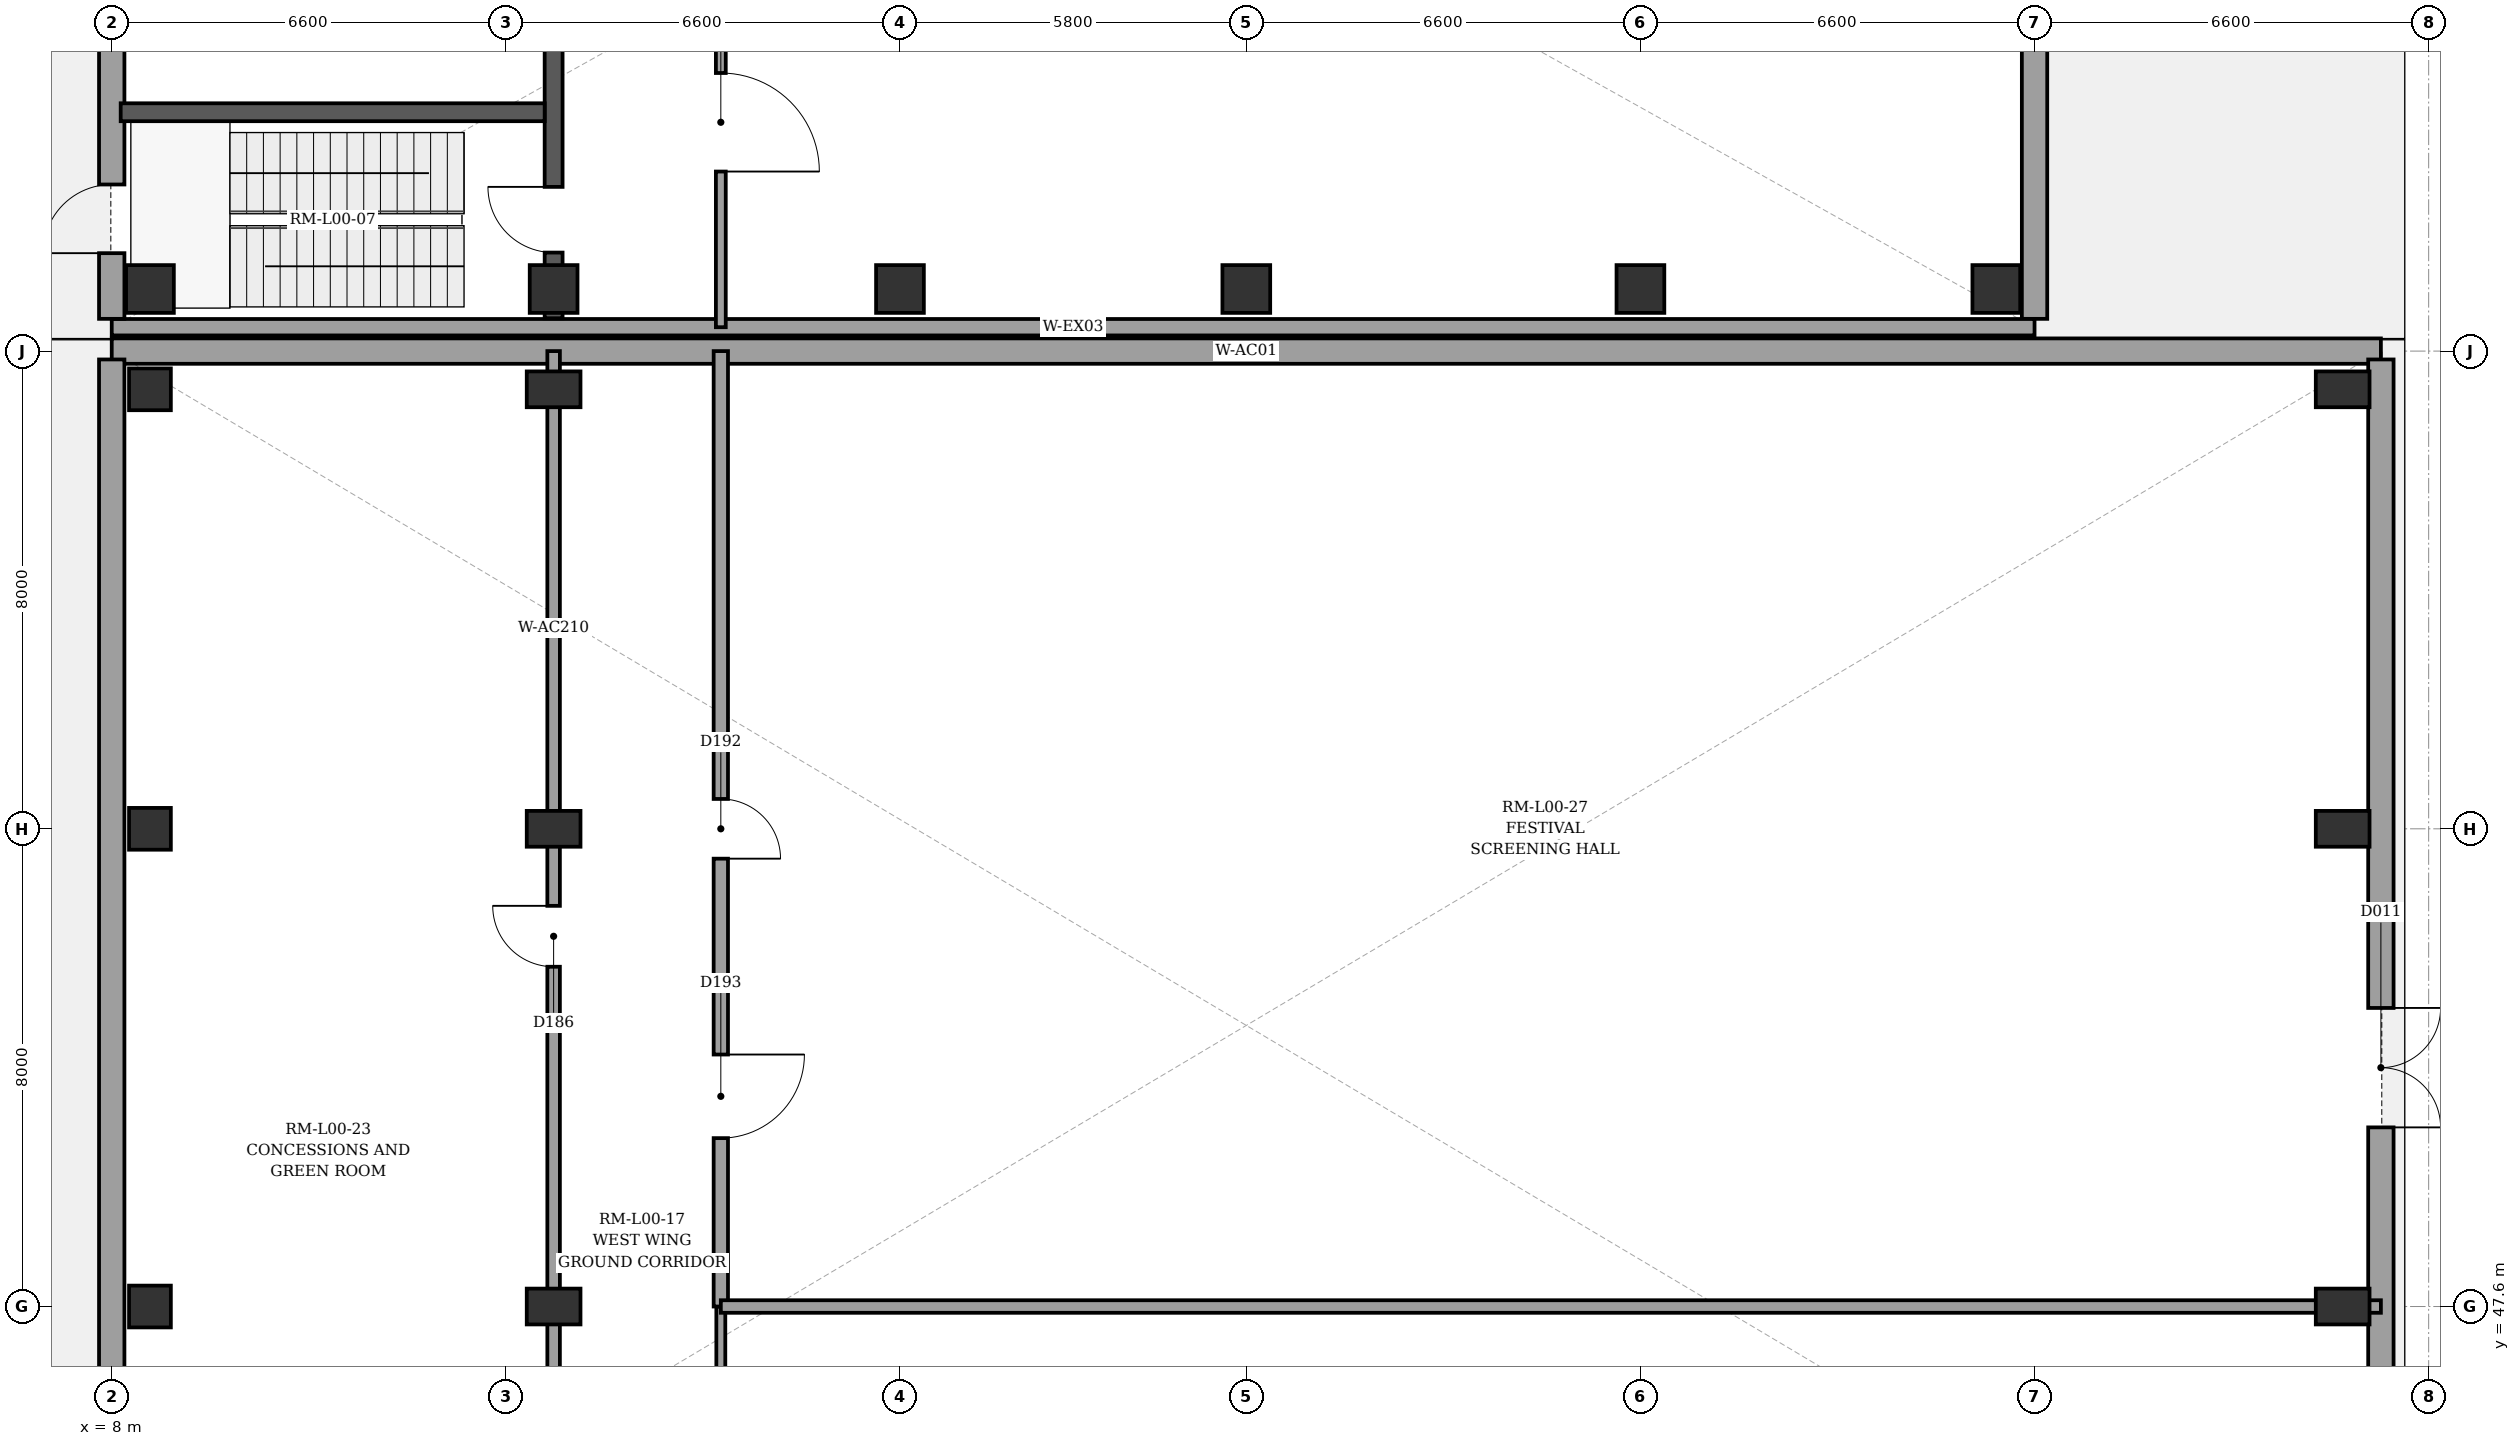
"""IFC4 building model, lengths in metres.
Left out: names, types, materials, properties, quantities, classifications, styles, units other than length and angle.
Written with IfcOpenShell. Run it as: python <this file> out.ifc"""

import sys

from ifc_helpers import new_model, si_unit, direction, frame, frame_2d, origin, origin_2d, place, context, subcontext, project, spatial, rectangle, extrude, element, fill, save


model = new_model("IFC4")
c1 = context("Model", 3, precision=1e-05, world=origin(), true_north=direction((0.0, 1.0)))
c2 = subcontext(c1, "Body", "Model", "MODEL_VIEW")
j1 = project(units=[si_unit("LENGTHUNIT", "METRE"), si_unit("PLANEANGLEUNIT", "RADIAN")], contexts=[c1])
p1 = place(None, origin())
s1 = spatial("IfcSite", under=j1, at=p1, CompositionType="ELEMENT")
p2 = place(p1, origin())
s2 = spatial("IfcBuilding", under=s1, at=p2, CompositionType="ELEMENT")
p3 = place(p2, origin())
s3 = spatial("IfcBuildingStorey", under=s2, at=p3, CompositionType="ELEMENT", Elevation=0.0)
for number, where, z_axis, x_axis in (
    (1, (8.64, 47.6, 0.0), (0.0, 0.0, 1.0), (1.0, 0.0, 0.0)),
    (2, (8.64, 55.6, 0.0), (0.0, 0.0, 1.0), (1.0, 0.0, 0.0)),
    (3, (8.64, 62.96, 0.0), (0.0, 0.0, 1.0), (1.0, 0.0, 0.0)),
):
    element("IfcColumn", number, at=place(p3, frame(where, z_axis=z_axis, x_axis=x_axis)), inside=s3, PredefinedType="COLUMN", context=c2, shape_type="SweptSolid", body=[
        extrude(rectangle(XDim=0.7, YDim=0.7, at=origin_2d()), origin(), (0.0, 0.0, 1.0), 5.4),
    ])
for number, where, z_axis, x_axis in (
    (4, (15.4, 47.6, 0.0), (0.0, 0.0, 1.0), (1.0, 0.0, 0.0)),
    (5, (15.4, 55.6, 0.0), (0.0, 0.0, 1.0), (1.0, 0.0, 0.0)),
    (6, (15.4, 62.96, 0.0), (0.0, 0.0, 1.0), (1.0, 0.0, 0.0)),
    (7, (45.36, 47.6, 0.0), (0.0, 0.0, 1.0), (1.0, 0.0, 0.0)),
    (8, (45.36, 55.6, 0.0), (0.0, 0.0, 1.0), (1.0, 0.0, 0.0)),
    (9, (45.36, 62.96, 0.0), (0.0, 0.0, 1.0), (1.0, 0.0, 0.0)),
):
    element("IfcColumn", number, at=place(p3, frame(where, z_axis=z_axis, x_axis=x_axis)), inside=s3, PredefinedType="COLUMN", context=c2, shape_type="SweptSolid", body=[
        extrude(rectangle(XDim=0.6, YDim=0.9, at=origin_2d()), origin(), (0.0, 0.0, 1.0), 5.4),
    ])
for number, where, z_axis, x_axis in (
    (10, (8.64, 64.64, 0.0), (0.0, 0.0, 1.0), (1.0, 0.0, 0.0)),
    (11, (15.4, 64.64, 0.0), (0.0, 0.0, 1.0), (1.0, 0.0, 0.0)),
    (12, (21.2, 64.64, 0.0), (0.0, 0.0, 1.0), (1.0, 0.0, 0.0)),
    (13, (27.0, 64.64, 0.0), (0.0, 0.0, 1.0), (1.0, 0.0, 0.0)),
    (14, (33.6, 64.64, 0.0), (0.0, 0.0, 1.0), (1.0, 0.0, 0.0)),
    (15, (39.56, 64.64, 0.0), (0.0, 0.0, 1.0), (1.0, 0.0, 0.0)),
):
    element("IfcColumn", number, at=place(p3, frame(where, z_axis=z_axis, x_axis=x_axis)), inside=s3, PredefinedType="COLUMN", context=c2, shape_type="SweptSolid", body=[
        extrude(rectangle(XDim=0.8, YDim=0.8, at=origin_2d()), origin(), (0.0, 0.0, 1.0), 5.4),
    ])
p4 = place(p3, frame((8.0, 63.6, 0.0), z_axis=(0.0, 0.0, 1.0), x_axis=(1.0, 0.0, 0.0)))
e16 = element("IfcWall", 16, at=p4, inside=s3, PredefinedType="SOLIDWALL", context=c2, shape_type="SweptSolid", body=[
    extrude(rectangle(XDim=38.0, YDim=0.425, at=frame_2d((19.0, 0.0))), origin(), (0.0, 0.0, 1.0), 5.14),
])
p5 = place(p3, frame((46.0, 63.46, 0.0), z_axis=(0.0, 0.0, 1.0), x_axis=(0.0, -1.0, 0.0)))
e17 = element("IfcWall", 17, at=p5, inside=s3, PredefinedType="SOLIDWALL", context=c2, shape_type="SweptSolid", body=[
    extrude(rectangle(XDim=55.72, YDim=0.425, at=frame_2d((27.86, 0.0))), origin(), (0.0, 0.0, 1.0), 5.14),
])
p6 = place(p5, frame((52.62, 0.0, 0.0)))
e18 = element("IfcOpeningElement", 18, at=p6, cuts=e17, PredefinedType="OPENING", context=c2, shape_type="SweptSolid", body=[
    extrude(rectangle(XDim=2.0, YDim=2.5, at=frame_2d((1.0, 1.25))), frame((0.0, 0.222, 0.0), z_axis=(0.0, -1.0, 0.0), x_axis=(1.0, 0.0, 0.0)), (0.0, 0.0, 1.0), 0.445),
])
p7 = place(p5, frame((10.86, 0.0, 0.0)))
e19 = element("IfcOpeningElement", 19, at=p7, cuts=e17, PredefinedType="OPENING", context=c2, shape_type="SweptSolid", body=[
    extrude(rectangle(XDim=2.0, YDim=2.5, at=frame_2d((1.0, 1.25))), frame((0.0, 0.222, 0.0), z_axis=(0.0, -1.0, 0.0), x_axis=(1.0, 0.0, 0.0)), (0.0, 0.0, 1.0), 0.445),
])
p8 = place(p3, frame((8.0, 7.74, 0.0), z_axis=(0.0, 0.0, 1.0), x_axis=(0.0, 1.0, 0.0)))
e20 = element("IfcWall", 20, at=p8, inside=s3, PredefinedType="SOLIDWALL", context=c2, shape_type="SweptSolid", body=[
    extrude(rectangle(XDim=55.72, YDim=0.425, at=frame_2d((27.86, 0.0))), origin(), (0.0, 0.0, 1.0), 5.14),
])
p9 = place(p8, frame((1.1, 0.0, 0.0)))
e21 = element("IfcOpeningElement", 21, at=p9, cuts=e20, PredefinedType="OPENING", context=c2, shape_type="SweptSolid", body=[
    extrude(rectangle(XDim=1.15, YDim=2.2, at=frame_2d((0.575, 1.1))), frame((0.0, 0.222, 0.0), z_axis=(0.0, -1.0, 0.0), x_axis=(1.0, 0.0, 0.0)), (0.0, 0.0, 1.0), 0.445),
])
p10 = place(p8, frame((9.46, 0.0, 0.0)))
e22 = element("IfcOpeningElement", 22, at=p10, cuts=e20, PredefinedType="OPENING", context=c2, shape_type="SweptSolid", body=[
    extrude(rectangle(XDim=2.0, YDim=2.5, at=frame_2d((1.0, 1.25))), frame((0.0, 0.222, 0.0), z_axis=(0.0, -1.0, 0.0), x_axis=(1.0, 0.0, 0.0)), (0.0, 0.0, 1.0), 0.445),
])
p11 = place(p3, frame((40.2, 93.86, 0.0), z_axis=(0.0, 0.0, 1.0), x_axis=(0.0, -1.0, 0.0)))
e23 = element("IfcWall", 23, at=p11, inside=s3, PredefinedType="SOLIDWALL", context=c2, shape_type="SweptSolid", body=[
    extrude(rectangle(XDim=29.72, YDim=0.425, at=frame_2d((14.86, 0.0))), origin(), (0.0, 0.0, 1.0), 5.12),
])
p12 = place(p3, frame((40.2, 64.0, 0.0), z_axis=(0.0, 0.0, 1.0), x_axis=(-1.0, 0.0, 0.0)))
e24 = element("IfcWall", 24, at=p12, inside=s3, PredefinedType="SOLIDWALL", context=c2, shape_type="SweptSolid", body=[
    extrude(rectangle(XDim=32.2, YDim=0.275, at=frame_2d((16.1, 0.0))), origin(), (0.0, 0.0, 1.0), 5.12),
])
p13 = place(p3, frame((8.0, 64.14, 0.0), z_axis=(0.0, 0.0, 1.0), x_axis=(0.0, 1.0, 0.0)))
e25 = element("IfcWall", 25, at=p13, inside=s3, PredefinedType="SOLIDWALL", context=c2, shape_type="SweptSolid", body=[
    extrude(rectangle(XDim=29.72, YDim=0.425, at=frame_2d((14.86, 0.0))), origin(), (0.0, 0.0, 1.0), 5.12),
])
p14 = place(p13, frame((1.1, 0.0, 0.0)))
e26 = element("IfcOpeningElement", 26, at=p14, cuts=e25, PredefinedType="OPENING", context=c2, shape_type="SweptSolid", body=[
    extrude(rectangle(XDim=1.15, YDim=2.2, at=frame_2d((0.575, 1.1))), frame((0.0, 0.222, 0.0), z_axis=(0.0, -1.0, 0.0), x_axis=(1.0, 0.0, 0.0)), (0.0, 0.0, 1.0), 0.445),
])
p15 = place(p13, frame((18.86, 0.0, 0.0)))
e27 = element("IfcOpeningElement", 27, at=p15, cuts=e25, PredefinedType="OPENING", context=c2, shape_type="SweptSolid", body=[
    extrude(rectangle(XDim=2.0, YDim=2.5, at=frame_2d((1.0, 1.25))), frame((0.0, 0.222, 0.0), z_axis=(0.0, -1.0, 0.0), x_axis=(1.0, 0.0, 0.0)), (0.0, 0.0, 1.0), 0.445),
])
p16 = place(p3, frame((15.4, 64.15, 0.0), z_axis=(0.0, 0.0, 1.0), x_axis=(0.0, 1.0, 0.0)))
e28 = element("IfcWall", 28, at=p16, inside=s3, PredefinedType="SHEAR", context=c2, shape_type="SweptSolid", body=[
    extrude(rectangle(XDim=7.048, YDim=0.3, at=frame_2d((3.524, 0.0))), origin(), (0.0, 0.0, 1.0), 5.12),
])
p17 = place(p16, frame((1.1, 0.0, 0.0)))
e29 = element("IfcOpeningElement", 29, at=p17, cuts=e28, PredefinedType="OPENING", context=c2, shape_type="SweptSolid", body=[
    extrude(rectangle(XDim=1.1, YDim=2.15, at=frame_2d((0.55, 1.075))), frame((0.0, 0.16, 0.0), z_axis=(0.0, -1.0, 0.0), x_axis=(1.0, 0.0, 0.0)), (0.0, 0.0, 1.0), 0.32),
])
p18 = place(p16, frame((4.875, 0.0, 0.0)))
e30 = element("IfcOpeningElement", 30, at=p18, cuts=e28, PredefinedType="OPENING", context=c2, shape_type="SweptSolid", body=[
    extrude(rectangle(XDim=1.15, YDim=2.2, at=frame_2d((0.575, 1.1))), frame((0.0, 0.16, 0.0), z_axis=(0.0, -1.0, 0.0), x_axis=(1.0, 0.0, 0.0)), (0.0, 0.0, 1.0), 0.32),
])
p19 = place(p3, frame((8.15, 67.6, 0.0), z_axis=(0.0, 0.0, 1.0), x_axis=(1.0, 0.0, 0.0)))
e31 = element("IfcWall", 31, at=p19, inside=s3, PredefinedType="SHEAR", context=c2, shape_type="SweptSolid", body=[
    extrude(rectangle(XDim=7.1, YDim=0.3, at=frame_2d((3.55, 0.0))), origin(), (0.0, 0.0, 1.0), 5.12),
])
p20 = place(p3, frame((15.4, 44.0, 0.0), z_axis=(0.0, 0.0, 1.0), x_axis=(0.0, 1.0, 0.0)))
e32 = element("IfcWall", 32, at=p20, inside=s3, PredefinedType="PARTITIONING", context=c2, shape_type="SweptSolid", body=[
    extrude(rectangle(XDim=19.6, YDim=0.21, at=frame_2d((9.8, 0.0))), origin(), (0.0, 0.0, 1.0), 4.29),
])
p21 = place(p20, frame((9.29, 0.0, 0.0)))
e33 = element("IfcOpeningElement", 33, at=p21, cuts=e32, PredefinedType="OPENING", context=c2, shape_type="SweptSolid", body=[
    extrude(rectangle(XDim=1.02, YDim=2.1, at=frame_2d((0.51, 1.05))), frame((0.0, 0.115, 0.0), z_axis=(0.0, -1.0, 0.0), x_axis=(1.0, 0.0, 0.0)), (0.0, 0.0, 1.0), 0.23),
])
p22 = place(p3, frame((18.2, 47.6, 0.0), z_axis=(0.0, 0.0, 1.0), x_axis=(0.0, -1.0, 0.0)))
e34 = element("IfcWall", 34, at=p22, inside=s3, PredefinedType="PARTITIONING", context=c2, shape_type="SweptSolid", body=[
    extrude(rectangle(XDim=16.0, YDim=0.15, at=frame_2d((8.0, 0.0))), origin(), (0.0, 0.0, 1.0), 5.14),
])
p23 = place(p22, frame((6.18, 0.0, 0.0)))
e35 = element("IfcOpeningElement", 35, at=p23, cuts=e34, PredefinedType="OPENING", context=c2, shape_type="SweptSolid", body=[
    extrude(rectangle(XDim=0.98, YDim=2.1, at=frame_2d((0.49, 1.05))), frame((0.0, 0.085, 0.0), z_axis=(0.0, -1.0, 0.0), x_axis=(1.0, 0.0, 0.0)), (0.0, 0.0, 1.0), 0.17),
])
p24 = place(p22, frame((11.99, 0.0, 0.0)))
e36 = element("IfcOpeningElement", 36, at=p24, cuts=e34, PredefinedType="OPENING", context=c2, shape_type="SweptSolid", body=[
    extrude(rectangle(XDim=0.98, YDim=2.1, at=frame_2d((0.49, 1.05))), frame((0.0, 0.085, 0.0), z_axis=(0.0, -1.0, 0.0), x_axis=(1.0, 0.0, 0.0)), (0.0, 0.0, 1.0), 0.17),
])
p25 = place(p3, frame((18.2, 63.6, 0.0), z_axis=(0.0, 0.0, 1.0), x_axis=(0.0, -1.0, 0.0)))
e37 = element("IfcWall", 37, at=p25, inside=s3, PredefinedType="PARTITIONING", context=c2, shape_type="SweptSolid", body=[
    extrude(rectangle(XDim=16.0, YDim=0.24, at=frame_2d((8.0, 0.0))), origin(), (0.0, 0.0, 1.0), 5.14),
])
p26 = place(p25, frame((7.5, 0.0, 0.0)))
e38 = element("IfcOpeningElement", 38, at=p26, cuts=e37, PredefinedType="OPENING", context=c2, shape_type="SweptSolid", body=[
    extrude(rectangle(XDim=1.0, YDim=2.1, at=frame_2d((0.5, 1.05))), frame((0.0, 0.13, 0.0), z_axis=(0.0, -1.0, 0.0), x_axis=(1.0, 0.0, 0.0)), (0.0, 0.0, 1.0), 0.26),
])
p27 = place(p25, frame((11.78, 0.0, 0.0)))
e39 = element("IfcOpeningElement", 39, at=p27, cuts=e37, PredefinedType="OPENING", context=c2, shape_type="SweptSolid", body=[
    extrude(rectangle(XDim=1.4, YDim=2.25, at=frame_2d((0.7, 1.125))), frame((0.0, 0.13, 0.0), z_axis=(0.0, -1.0, 0.0), x_axis=(1.0, 0.0, 0.0)), (0.0, 0.0, 1.0), 0.26),
])
p28 = place(p3, frame((18.2, 47.6, 0.0), z_axis=(0.0, 0.0, 1.0), x_axis=(1.0, 0.0, 0.0)))
e40 = element("IfcWall", 40, at=p28, inside=s3, PredefinedType="PARTITIONING", context=c2, shape_type="SweptSolid", body=[
    extrude(rectangle(XDim=27.8, YDim=0.21, at=frame_2d((13.9, 0.0))), origin(), (0.0, 0.0, 1.0), 4.29),
])
p29 = place(p3, frame((18.2, 79.6, 0.0), z_axis=(0.0, 0.0, 1.0), x_axis=(0.0, -1.0, 0.0)))
e41 = element("IfcWall", 41, at=p29, inside=s3, PredefinedType="PARTITIONING", context=c2, shape_type="SweptSolid", body=[
    extrude(rectangle(XDim=15.6, YDim=0.165, at=frame_2d((7.8, 0.0))), origin(), (0.0, 0.0, 1.0), 5.12),
])
p30 = place(p29, frame((6.975, 0.0, 0.0)))
e42 = element("IfcOpeningElement", 42, at=p30, cuts=e41, PredefinedType="OPENING", context=c2, shape_type="SweptSolid", body=[
    extrude(rectangle(XDim=1.65, YDim=2.3, at=frame_2d((0.825, 1.15))), frame((0.0, 0.093, 0.0), z_axis=(0.0, -1.0, 0.0), x_axis=(1.0, 0.0, 0.0)), (0.0, 0.0, 1.0), 0.185),
])
p31 = place(p29, frame((11.343, 0.0, 0.0)))
e43 = element("IfcOpeningElement", 43, at=p31, cuts=e41, PredefinedType="OPENING", context=c2, shape_type="SweptSolid", body=[
    extrude(rectangle(XDim=1.65, YDim=2.3, at=frame_2d((0.825, 1.15))), frame((0.0, 0.093, 0.0), z_axis=(0.0, -1.0, 0.0), x_axis=(1.0, 0.0, 0.0)), (0.0, 0.0, 1.0), 0.185),
])
p32 = place(p14, origin())
e44 = element("IfcDoor", 44, at=p32, inside=s3, OperationType="SINGLE_SWING_LEFT", PredefinedType="DOOR", context=c2, shape_type="SweptSolid", body=[
    extrude(rectangle(XDim=1.15, YDim=2.2, at=frame_2d((0.575, 1.1))), frame((0.0, 0.025, 0.0), z_axis=(0.0, -1.0, 0.0), x_axis=(1.0, 0.0, 0.0)), (0.0, 0.0, 1.0), 0.05),
])
fill(e26, e44)
p33 = place(p7, origin())
e45 = element("IfcDoor", 45, at=p33, inside=s3, OperationType="DOUBLE_SWING_LEFT", PredefinedType="DOOR", context=c2, shape_type="SweptSolid", body=[
    extrude(rectangle(XDim=2.0, YDim=2.5, at=frame_2d((1.0, 1.25))), frame((0.0, 0.025, 0.0), z_axis=(0.0, -1.0, 0.0), x_axis=(1.0, 0.0, 0.0)), (0.0, 0.0, 1.0), 0.05),
])
fill(e19, e45)
p34 = place(p17, origin())
e46 = element("IfcDoor", 46, at=p34, inside=s3, OperationType="SINGLE_SWING_RIGHT", PredefinedType="DOOR", context=c2, shape_type="SweptSolid", body=[
    extrude(rectangle(XDim=1.1, YDim=2.15, at=frame_2d((0.55, 1.075))), frame((0.0, 0.025, 0.0), z_axis=(0.0, -1.0, 0.0), x_axis=(1.0, 0.0, 0.0)), (0.0, 0.0, 1.0), 0.05),
])
fill(e29, e46)
p35 = place(p21, origin())
e47 = element("IfcDoor", 47, at=p35, inside=s3, OperationType="SINGLE_SWING_RIGHT", PredefinedType="DOOR", context=c2, shape_type="SweptSolid", body=[
    extrude(rectangle(XDim=1.02, YDim=2.1, at=frame_2d((0.51, 1.05))), frame((0.0, 0.025, 0.0), z_axis=(0.0, -1.0, 0.0), x_axis=(1.0, 0.0, 0.0)), (0.0, 0.0, 1.0), 0.05),
])
fill(e33, e47)
p36 = place(p26, origin())
e48 = element("IfcDoor", 48, at=p36, inside=s3, OperationType="SINGLE_SWING_RIGHT", PredefinedType="DOOR", context=c2, shape_type="SweptSolid", body=[
    extrude(rectangle(XDim=1.0, YDim=2.1, at=frame_2d((0.5, 1.05))), frame((0.0, 0.025, 0.0), z_axis=(0.0, -1.0, 0.0), x_axis=(1.0, 0.0, 0.0)), (0.0, 0.0, 1.0), 0.05),
])
fill(e38, e48)
p37 = place(p27, origin())
e49 = element("IfcDoor", 49, at=p37, inside=s3, OperationType="SINGLE_SWING_LEFT", PredefinedType="DOOR", context=c2, shape_type="SweptSolid", body=[
    extrude(rectangle(XDim=1.4, YDim=2.25, at=frame_2d((0.7, 1.125))), frame((0.0, 0.025, 0.0), z_axis=(0.0, -1.0, 0.0), x_axis=(1.0, 0.0, 0.0)), (0.0, 0.0, 1.0), 0.05),
])
fill(e39, e49)
p38 = place(p31, origin())
e50 = element("IfcDoor", 50, at=p38, inside=s3, OperationType="SINGLE_SWING_RIGHT", PredefinedType="DOOR", context=c2, shape_type="SweptSolid", body=[
    extrude(rectangle(XDim=1.65, YDim=2.3, at=frame_2d((0.825, 1.15))), frame((0.0, 0.025, 0.0), z_axis=(0.0, -1.0, 0.0), x_axis=(1.0, 0.0, 0.0)), (0.0, 0.0, 1.0), 0.05),
])
fill(e43, e50)
save(model, sys.argv[1])
